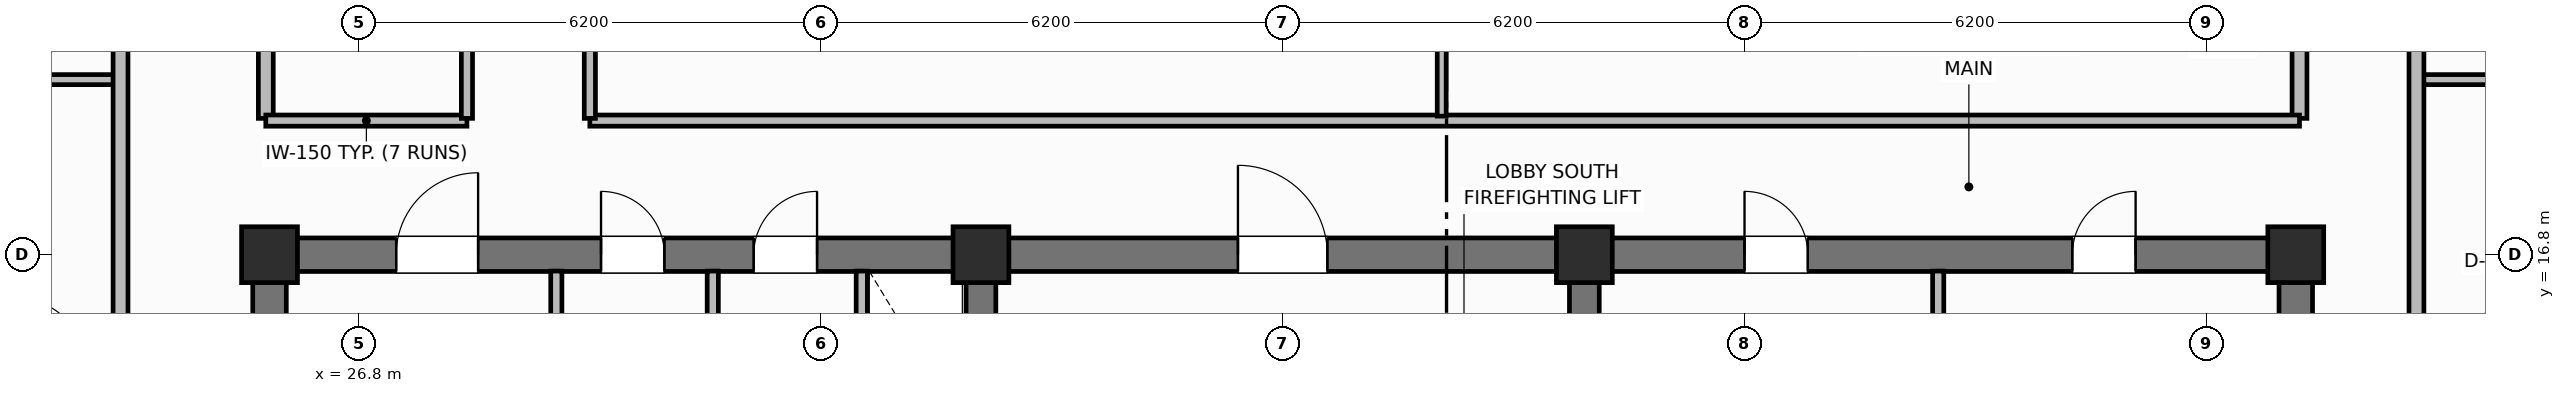
"""IFC4 building model, lengths in metres.
Left out: names, types, materials, properties, quantities, classifications, styles, units other than length and angle.
Written with IfcOpenShell. Run it as: python <this file> out.ifc"""

import sys

from ifc_helpers import new_model, si_unit, direction, frame, frame_2d, origin, origin_2d, place, context, subcontext, project, spatial, rectangle, extrude, element, fill, save


model = new_model("IFC4")
c1 = context("Model", 3, precision=1e-05, world=origin(), true_north=direction((0.0, 1.0)))
c2 = subcontext(c1, "Body", "Model", "MODEL_VIEW")
j1 = project(units=[si_unit("LENGTHUNIT", "METRE"), si_unit("PLANEANGLEUNIT", "RADIAN")], contexts=[c1])
p1 = place(None, origin())
s1 = spatial("IfcSite", under=j1, at=p1, CompositionType="ELEMENT")
p2 = place(p1, origin())
s2 = spatial("IfcBuilding", under=s1, at=p2, CompositionType="ELEMENT")
p3 = place(p2, frame((0.0, 0.0, 289.8)))
s3 = spatial("IfcBuildingStorey", under=s2, at=p3, CompositionType="ELEMENT", Elevation=289.8)
for number, where, z_axis, x_axis in (
    (1, (25.6, 10.825, 0.0), (0.0, 0.0, 1.0), (0.0, 1.0, 0.0)),
    (2, (52.8, 10.825, 0.0), (0.0, 0.0, 1.0), (0.0, 1.0, 0.0)),
):
    element("IfcWall", number, at=place(p3, frame(where, z_axis=z_axis, x_axis=x_axis)), inside=s3, PredefinedType="SHEAR", context=c2, shape_type="SweptSolid", body=[
        extrude(rectangle(XDim=5.75, YDim=0.45, at=frame_2d((2.875, 0.0))), origin(), (0.0, 0.0, 1.0), 3.7),
    ])
p4 = place(p3, frame((25.6, 16.8, 0.0), z_axis=(0.0, 0.0, 1.0), x_axis=(1.0, 0.0, 0.0)))
e3 = element("IfcWall", 3, at=p4, inside=s3, PredefinedType="SHEAR", context=c2, shape_type="SweptSolid", body=[
    extrude(rectangle(XDim=27.2, YDim=0.45, at=frame_2d((13.6, 0.0))), origin(), (0.0, 0.0, 1.0), 3.7),
])
p5 = place(p4, frame((1.7, 0.0, 0.0)))
e4 = element("IfcOpeningElement", 4, at=p5, cuts=e3, PredefinedType="OPENING", context=c2, shape_type="SweptSolid", body=[
    extrude(rectangle(XDim=1.1, YDim=2.15, at=frame_2d((0.55, 1.075))), frame((0.0, 0.235, 0.0), z_axis=(0.0, -1.0, 0.0), x_axis=(1.0, 0.0, 0.0)), (0.0, 0.0, 1.0), 0.47),
])
p6 = place(p4, frame((4.45, 0.0, 0.0)))
e5 = element("IfcOpeningElement", 5, at=p6, cuts=e3, PredefinedType="OPENING", context=c2, shape_type="SweptSolid", body=[
    extrude(rectangle(XDim=0.85, YDim=2.1, at=frame_2d((0.425, 1.05))), frame((0.0, 0.235, 0.0), z_axis=(0.0, -1.0, 0.0), x_axis=(1.0, 0.0, 0.0)), (0.0, 0.0, 1.0), 0.47),
])
p7 = place(p4, frame((6.5, 0.0, 0.0)))
e6 = element("IfcOpeningElement", 6, at=p7, cuts=e3, PredefinedType="OPENING", context=c2, shape_type="SweptSolid", body=[
    extrude(rectangle(XDim=0.85, YDim=2.1, at=frame_2d((0.425, 1.05))), frame((0.0, 0.235, 0.0), z_axis=(0.0, -1.0, 0.0), x_axis=(1.0, 0.0, 0.0)), (0.0, 0.0, 1.0), 0.47),
])
p8 = place(p4, frame((13.0, 0.0, 0.0)))
e7 = element("IfcOpeningElement", 7, at=p8, cuts=e3, PredefinedType="OPENING", context=c2, shape_type="SweptSolid", body=[
    extrude(rectangle(XDim=1.2, YDim=2.15, at=frame_2d((0.6, 1.075))), frame((0.0, 0.235, 0.0), z_axis=(0.0, -1.0, 0.0), x_axis=(1.0, 0.0, 0.0)), (0.0, 0.0, 1.0), 0.47),
])
p9 = place(p4, frame((19.8, 0.0, 0.0)))
e8 = element("IfcOpeningElement", 8, at=p9, cuts=e3, PredefinedType="OPENING", context=c2, shape_type="SweptSolid", body=[
    extrude(rectangle(XDim=0.85, YDim=2.1, at=frame_2d((0.425, 1.05))), frame((0.0, 0.235, 0.0), z_axis=(0.0, -1.0, 0.0), x_axis=(1.0, 0.0, 0.0)), (0.0, 0.0, 1.0), 0.47),
])
p10 = place(p4, frame((24.2, 0.0, 0.0)))
e9 = element("IfcOpeningElement", 9, at=p10, cuts=e3, PredefinedType="OPENING", context=c2, shape_type="SweptSolid", body=[
    extrude(rectangle(XDim=0.85, YDim=2.1, at=frame_2d((0.425, 1.05))), frame((0.0, 0.235, 0.0), z_axis=(0.0, -1.0, 0.0), x_axis=(1.0, 0.0, 0.0)), (0.0, 0.0, 1.0), 0.47),
])
for number, where, z_axis, x_axis in (
    (10, (35.15, 10.825, 0.0), (0.0, 0.0, 1.0), (0.0, 1.0, 0.0)),
    (11, (43.25, 10.825, 0.0), (0.0, 0.0, 1.0), (0.0, 1.0, 0.0)),
):
    element("IfcWall", number, at=place(p3, frame(where, z_axis=z_axis, x_axis=x_axis)), inside=s3, PredefinedType="SHEAR", context=c2, shape_type="SweptSolid", body=[
        extrude(rectangle(XDim=5.75, YDim=0.4, at=frame_2d((2.875, 0.0))), origin(), (0.0, 0.0, 1.0), 3.7),
    ])
for number, where, z_axis, x_axis in (
    (12, (25.6, 16.8, 0.0), (0.0, 0.0, 1.0), (1.0, 0.0, 0.0)),
    (13, (35.15, 16.8, 0.0), (0.0, 0.0, 1.0), (1.0, 0.0, 0.0)),
    (14, (43.25, 16.8, 0.0), (0.0, 0.0, 1.0), (1.0, 0.0, 0.0)),
    (15, (52.8, 16.8, 0.0), (0.0, 0.0, 1.0), (1.0, 0.0, 0.0)),
):
    element("IfcColumn", number, at=place(p3, frame(where, z_axis=z_axis, x_axis=x_axis)), inside=s3, PredefinedType="COLUMN", context=c2, shape_type="SweptSolid", body=[
        extrude(rectangle(XDim=0.75, YDim=0.75, at=origin_2d()), origin(), (0.0, 0.0, 1.0), 3.7),
    ])
for number, where, z_axis, x_axis in (
    (16, (29.45, 14.5, 0.0), (0.0, 0.0, 1.0), (0.0, 1.0, 0.0)),
    (17, (31.55, 14.5, 0.0), (0.0, 0.0, 1.0), (0.0, 1.0, 0.0)),
):
    element("IfcWall", number, at=place(p3, frame(where, z_axis=z_axis, x_axis=x_axis)), inside=s3, PredefinedType="PARTITIONING", context=c2, shape_type="SweptSolid", body=[
        extrude(rectangle(XDim=2.08, YDim=0.15, at=frame_2d((1.04, 0.0))), origin(), (0.0, 0.0, 1.0), 2.56),
    ])
p11 = place(p3, frame((33.55, 14.5, 0.0), z_axis=(0.0, 0.0, 1.0), x_axis=(0.0, 1.0, 0.0)))
e18 = element("IfcWall", 18, at=p11, inside=s3, PredefinedType="PARTITIONING", context=c2, shape_type="SweptSolid", body=[
    extrude(rectangle(XDim=2.08, YDim=0.15, at=frame_2d((1.04, 0.0))), origin(), (0.0, 0.0, 1.0), 2.56),
])
p12 = place(p11, frame((0.55, 0.0, 0.0)))
e19 = element("IfcOpeningElement", 19, at=p12, cuts=e18, PredefinedType="OPENING", context=c2, shape_type="SweptSolid", body=[
    extrude(rectangle(XDim=0.85, YDim=2.05, at=frame_2d((0.425, 1.025))), frame((0.0, 0.085, 0.0), z_axis=(0.0, -1.0, 0.0), x_axis=(1.0, 0.0, 0.0)), (0.0, 0.0, 1.0), 0.17),
])
p13 = place(p3, frame((48.0, 10.95, 0.0), z_axis=(0.0, 0.0, 1.0), x_axis=(0.0, 1.0, 0.0)))
e20 = element("IfcWall", 20, at=p13, inside=s3, PredefinedType="PARTITIONING", context=c2, shape_type="SweptSolid", body=[
    extrude(rectangle(XDim=5.63, YDim=0.15, at=frame_2d((2.815, 0.0))), origin(), (0.0, 0.0, 1.0), 2.56),
])
for number, where, z_axis, x_axis in (
    (21, (25.55, 18.63, 0.0), (0.0, 0.0, 1.0), (0.0, 1.0, 0.0)),
    (22, (52.85, 18.63, 0.0), (0.0, 0.0, 1.0), (0.0, 1.0, 0.0)),
):
    element("IfcWall", number, at=place(p3, frame(where, z_axis=z_axis, x_axis=x_axis)), inside=s3, PredefinedType="PARTITIONING", context=c2, shape_type="SweptSolid", body=[
        extrude(rectangle(XDim=19.14, YDim=0.2, at=frame_2d((9.57, 0.0))), origin(), (0.0, 0.0, 1.0), 2.56),
    ])
p14 = place(p3, frame((25.55, 18.6, 0.0), z_axis=(0.0, 0.0, 1.0), x_axis=(1.0, 0.0, 0.0)))
e23 = element("IfcWall", 23, at=p14, inside=s3, PredefinedType="PARTITIONING", context=c2, shape_type="SweptSolid", body=[
    extrude(rectangle(XDim=2.7, YDim=0.15, at=frame_2d((1.35, 0.0))), origin(), (0.0, 0.0, 1.0), 2.56),
])
p15 = place(p3, frame((29.9, 18.6, 0.0), z_axis=(0.0, 0.0, 1.0), x_axis=(1.0, 0.0, 0.0)))
e24 = element("IfcWall", 24, at=p15, inside=s3, PredefinedType="PARTITIONING", context=c2, shape_type="SweptSolid", body=[
    extrude(rectangle(XDim=22.95, YDim=0.15, at=frame_2d((11.475, 0.0))), origin(), (0.0, 0.0, 1.0), 2.56),
])
p16 = place(p3, frame((41.335, 18.66, 0.0), z_axis=(0.0, 0.0, 1.0), x_axis=(0.0, 1.0, 0.0)))
e25 = element("IfcWall", 25, at=p16, inside=s3, PredefinedType="PARTITIONING", context=c2, shape_type="SweptSolid", body=[
    extrude(rectangle(XDim=6.821, YDim=0.12, at=frame_2d((3.41, 0.0))), origin(), (0.0, 0.0, 1.0), 2.56),
])
p17 = place(p16, frame((2.0, 0.0, 0.0)))
e26 = element("IfcOpeningElement", 26, at=p17, cuts=e25, PredefinedType="OPENING", context=c2, shape_type="SweptSolid", body=[
    extrude(rectangle(XDim=0.9, YDim=2.1, at=frame_2d((0.45, 1.05))), frame((0.0, 0.07, 0.0), z_axis=(0.0, -1.0, 0.0), x_axis=(1.0, 0.0, 0.0)), (0.0, 0.0, 1.0), 0.14),
])
p18 = place(p3, frame((28.25, 18.63, 0.0), z_axis=(0.0, 0.0, 1.0), x_axis=(0.0, 1.0, 0.0)))
e27 = element("IfcWall", 27, at=p18, inside=s3, PredefinedType="PARTITIONING", context=c2, shape_type="SweptSolid", body=[
    extrude(rectangle(XDim=19.14, YDim=0.15, at=frame_2d((9.57, 0.0))), origin(), (0.0, 0.0, 1.0), 2.56),
])
p19 = place(p18, frame((3.0, 0.0, 0.0)))
e28 = element("IfcOpeningElement", 28, at=p19, cuts=e27, PredefinedType="OPENING", context=c2, shape_type="SweptSolid", body=[
    extrude(rectangle(XDim=0.9, YDim=2.1, at=frame_2d((0.45, 1.05))), frame((0.0, 0.085, 0.0), z_axis=(0.0, -1.0, 0.0), x_axis=(1.0, 0.0, 0.0)), (0.0, 0.0, 1.0), 0.17),
])
p20 = place(p18, frame((11.5, 0.0, 0.0)))
e29 = element("IfcOpeningElement", 29, at=p20, cuts=e27, PredefinedType="OPENING", context=c2, shape_type="SweptSolid", body=[
    extrude(rectangle(XDim=0.9, YDim=2.1, at=frame_2d((0.45, 1.05))), frame((0.0, 0.085, 0.0), z_axis=(0.0, -1.0, 0.0), x_axis=(1.0, 0.0, 0.0)), (0.0, 0.0, 1.0), 0.17),
])
p21 = place(p3, frame((29.9, 18.63, 0.0), z_axis=(0.0, 0.0, 1.0), x_axis=(0.0, 1.0, 0.0)))
e30 = element("IfcWall", 30, at=p21, inside=s3, PredefinedType="PARTITIONING", context=c2, shape_type="SweptSolid", body=[
    extrude(rectangle(XDim=19.14, YDim=0.15, at=frame_2d((9.57, 0.0))), origin(), (0.0, 0.0, 1.0), 2.56),
])
p22 = place(p21, frame((2.2, 0.0, 0.0)))
e31 = element("IfcOpeningElement", 31, at=p22, cuts=e30, PredefinedType="OPENING", context=c2, shape_type="SweptSolid", body=[
    extrude(rectangle(XDim=1.0, YDim=2.15, at=frame_2d((0.5, 1.075))), frame((0.0, 0.085, 0.0), z_axis=(0.0, -1.0, 0.0), x_axis=(1.0, 0.0, 0.0)), (0.0, 0.0, 1.0), 0.17),
])
p23 = place(p21, frame((8.89, 0.0, 0.0)))
e32 = element("IfcOpeningElement", 32, at=p23, cuts=e30, PredefinedType="OPENING", context=c2, shape_type="SweptSolid", body=[
    extrude(rectangle(XDim=1.0, YDim=2.15, at=frame_2d((0.5, 1.075))), frame((0.0, 0.085, 0.0), z_axis=(0.0, -1.0, 0.0), x_axis=(1.0, 0.0, 0.0)), (0.0, 0.0, 1.0), 0.17),
])
p24 = place(p3, frame((21.65, 19.15, 0.0), z_axis=(0.0, 0.0, 1.0), x_axis=(1.0, 0.0, 0.0)))
e33 = element("IfcWall", 33, at=p24, inside=s3, PredefinedType="PARTITIONING", context=c2, shape_type="SweptSolid", body=[
    extrude(rectangle(XDim=1.95, YDim=0.135, at=frame_2d((0.975, 0.0))), origin(), (0.0, 0.0, 1.0), 2.56),
])
p25 = place(p3, frame((23.6, 9.95, 0.0), z_axis=(0.0, 0.0, 1.0), x_axis=(0.0, 1.0, 0.0)))
e34 = element("IfcWall", 34, at=p25, inside=s3, PredefinedType="PARTITIONING", context=c2, shape_type="SweptSolid", body=[
    extrude(rectangle(XDim=36.5, YDim=0.2, at=frame_2d((18.25, 0.0))), origin(), (0.0, 0.0, 1.0), 2.56),
])
p26 = place(p25, frame((3.25, 0.0, 0.0)))
e35 = element("IfcOpeningElement", 35, at=p26, cuts=e34, PredefinedType="OPENING", context=c2, shape_type="SweptSolid", body=[
    extrude(rectangle(XDim=1.0, YDim=2.15, at=frame_2d((0.5, 1.075))), frame((0.0, 0.11, 0.0), z_axis=(0.0, -1.0, 0.0), x_axis=(1.0, 0.0, 0.0)), (0.0, 0.0, 1.0), 0.22),
])
p27 = place(p25, frame((23.5, 0.0, 0.0)))
e36 = element("IfcOpeningElement", 36, at=p27, cuts=e34, PredefinedType="OPENING", context=c2, shape_type="SweptSolid", body=[
    extrude(rectangle(XDim=1.0, YDim=2.15, at=frame_2d((0.5, 1.075))), frame((0.0, 0.11, 0.0), z_axis=(0.0, -1.0, 0.0), x_axis=(1.0, 0.0, 0.0)), (0.0, 0.0, 1.0), 0.22),
])
p28 = place(p3, frame((54.42, 19.15, 0.0), z_axis=(0.0, 0.0, 1.0), x_axis=(1.0, 0.0, 0.0)))
e37 = element("IfcWall", 37, at=p28, inside=s3, PredefinedType="PARTITIONING", context=c2, shape_type="SweptSolid", body=[
    extrude(rectangle(XDim=1.95, YDim=0.135, at=frame_2d((0.975, 0.0))), origin(), (0.0, 0.0, 1.0), 2.56),
])
p29 = place(p3, frame((54.42, 9.95, 0.0), z_axis=(0.0, 0.0, 1.0), x_axis=(0.0, 1.0, 0.0)))
e38 = element("IfcWall", 38, at=p29, inside=s3, PredefinedType="PARTITIONING", context=c2, shape_type="SweptSolid", body=[
    extrude(rectangle(XDim=36.5, YDim=0.2, at=frame_2d((18.25, 0.0))), origin(), (0.0, 0.0, 1.0), 2.56),
])
p30 = place(p29, frame((3.25, 0.0, 0.0)))
e39 = element("IfcOpeningElement", 39, at=p30, cuts=e38, PredefinedType="OPENING", context=c2, shape_type="SweptSolid", body=[
    extrude(rectangle(XDim=1.0, YDim=2.15, at=frame_2d((0.5, 1.075))), frame((0.0, 0.11, 0.0), z_axis=(0.0, -1.0, 0.0), x_axis=(1.0, 0.0, 0.0)), (0.0, 0.0, 1.0), 0.22),
])
p31 = place(p29, frame((14.25, 0.0, 0.0)))
e40 = element("IfcOpeningElement", 40, at=p31, cuts=e38, PredefinedType="OPENING", context=c2, shape_type="SweptSolid", body=[
    extrude(rectangle(XDim=1.0, YDim=2.15, at=frame_2d((0.5, 1.075))), frame((0.0, 0.11, 0.0), z_axis=(0.0, -1.0, 0.0), x_axis=(1.0, 0.0, 0.0)), (0.0, 0.0, 1.0), 0.22),
])
p32 = place(p5, origin())
e41 = element("IfcDoor", 41, at=p32, inside=s3, OperationType="SINGLE_SWING_RIGHT", PredefinedType="DOOR", context=c2, shape_type="SweptSolid", body=[
    extrude(rectangle(XDim=1.1, YDim=2.15, at=frame_2d((0.55, 1.075))), frame((0.0, 0.025, 0.0), z_axis=(0.0, -1.0, 0.0), x_axis=(1.0, 0.0, 0.0)), (0.0, 0.0, 1.0), 0.05),
])
fill(e4, e41)
p33 = place(p6, origin())
e42 = element("IfcDoor", 42, at=p33, inside=s3, OperationType="SINGLE_SWING_LEFT", PredefinedType="DOOR", context=c2, shape_type="SweptSolid", body=[
    extrude(rectangle(XDim=0.85, YDim=2.1, at=frame_2d((0.425, 1.05))), frame((0.0, 0.025, 0.0), z_axis=(0.0, -1.0, 0.0), x_axis=(1.0, 0.0, 0.0)), (0.0, 0.0, 1.0), 0.05),
])
fill(e5, e42)
p34 = place(p7, origin())
e43 = element("IfcDoor", 43, at=p34, inside=s3, OperationType="SINGLE_SWING_RIGHT", PredefinedType="DOOR", context=c2, shape_type="SweptSolid", body=[
    extrude(rectangle(XDim=0.85, YDim=2.1, at=frame_2d((0.425, 1.05))), frame((0.0, 0.025, 0.0), z_axis=(0.0, -1.0, 0.0), x_axis=(1.0, 0.0, 0.0)), (0.0, 0.0, 1.0), 0.05),
])
fill(e6, e43)
p35 = place(p8, origin())
e44 = element("IfcDoor", 44, at=p35, inside=s3, OperationType="SINGLE_SWING_LEFT", PredefinedType="DOOR", context=c2, shape_type="SweptSolid", body=[
    extrude(rectangle(XDim=1.2, YDim=2.15, at=frame_2d((0.6, 1.075))), frame((0.0, 0.025, 0.0), z_axis=(0.0, -1.0, 0.0), x_axis=(1.0, 0.0, 0.0)), (0.0, 0.0, 1.0), 0.05),
])
fill(e7, e44)
p36 = place(p9, origin())
e45 = element("IfcDoor", 45, at=p36, inside=s3, OperationType="SINGLE_SWING_LEFT", PredefinedType="DOOR", context=c2, shape_type="SweptSolid", body=[
    extrude(rectangle(XDim=0.85, YDim=2.1, at=frame_2d((0.425, 1.05))), frame((0.0, 0.025, 0.0), z_axis=(0.0, -1.0, 0.0), x_axis=(1.0, 0.0, 0.0)), (0.0, 0.0, 1.0), 0.05),
])
fill(e8, e45)
p37 = place(p10, origin())
e46 = element("IfcDoor", 46, at=p37, inside=s3, OperationType="SINGLE_SWING_RIGHT", PredefinedType="DOOR", context=c2, shape_type="SweptSolid", body=[
    extrude(rectangle(XDim=0.85, YDim=2.1, at=frame_2d((0.425, 1.05))), frame((0.0, 0.025, 0.0), z_axis=(0.0, -1.0, 0.0), x_axis=(1.0, 0.0, 0.0)), (0.0, 0.0, 1.0), 0.05),
])
fill(e9, e46)
save(model, sys.argv[1])
